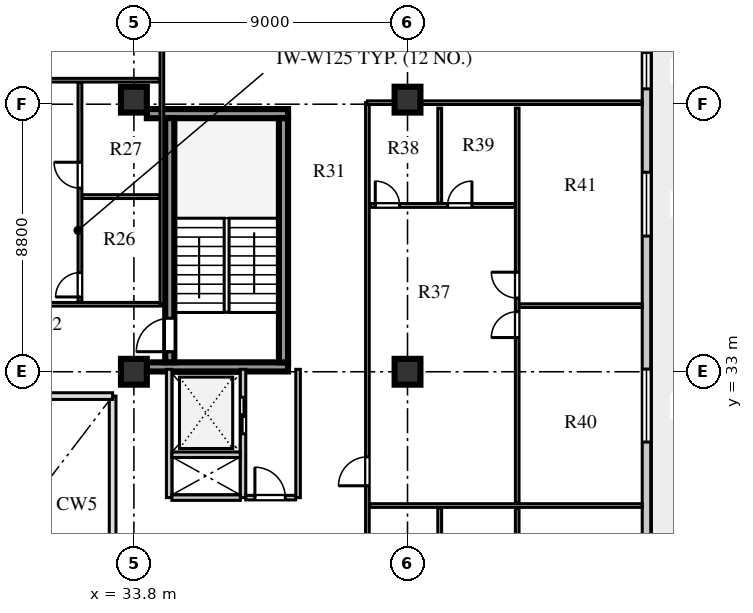
"""IFC4 building model, lengths in metres.
Left out: names, types, materials, properties, quantities, classifications, styles, units other than length and angle.
Written with IfcOpenShell. Run it as: python <this file> out.ifc"""

import sys

from ifc_helpers import new_model, si_unit, direction, frame, frame_2d, origin, origin_2d, place, context, subcontext, project, spatial, rectangle, extrude, element, fill, save


model = new_model("IFC4")
c1 = context("Model", 3, precision=1e-05, world=origin(), true_north=direction((0.0, 1.0)))
c2 = subcontext(c1, "Body", "Model", "MODEL_VIEW")
j1 = project(units=[si_unit("LENGTHUNIT", "METRE"), si_unit("PLANEANGLEUNIT", "RADIAN")], contexts=[c1])
p1 = place(None, origin())
s1 = spatial("IfcSite", under=j1, at=p1, CompositionType="ELEMENT")
p2 = place(p1, origin())
s2 = spatial("IfcBuilding", under=s1, at=p2, CompositionType="ELEMENT")
p3 = place(p2, frame((0.0, 0.0, 214.1)))
s3 = spatial("IfcBuildingStorey", under=s2, at=p3, CompositionType="ELEMENT", Elevation=214.1)
for number, where, z_axis, x_axis in (
    (1, (34.225, 33.16, 0.0), (0.0, 0.0, 1.0), (1.0, 0.0, 0.0)),
    (2, (34.225, 41.49, 0.0), (0.0, 0.0, 1.0), (1.0, 0.0, 0.0)),
):
    element("IfcWall", number, at=place(p3, frame(where, z_axis=z_axis, x_axis=x_axis)), inside=s3, PredefinedType="SHEAR", context=c2, shape_type="SweptSolid", body=[
        extrude(rectangle(XDim=4.645, YDim=0.3, at=frame_2d((2.323, 0.0))), origin(), (0.0, 0.0, 1.0), 3.66),
    ])
p4 = place(p3, frame((34.98, 33.31, 0.0), z_axis=(0.0, 0.0, 1.0), x_axis=(0.0, 1.0, 0.0)))
e3 = element("IfcWall", 3, at=p4, inside=s3, PredefinedType="SHEAR", context=c2, shape_type="SweptSolid", body=[
    extrude(rectangle(XDim=8.03, YDim=0.3, at=frame_2d((4.015, 0.0))), origin(), (0.0, 0.0, 1.0), 3.66),
])
p5 = place(p4, frame((0.35, 0.0, 0.0)))
e4 = element("IfcOpeningElement", 4, at=p5, cuts=e3, PredefinedType="OPENING", context=c2, shape_type="SweptSolid", body=[
    extrude(rectangle(XDim=1.1, YDim=2.1, at=frame_2d((0.55, 1.05))), frame((0.0, 0.16, 0.0), z_axis=(0.0, -1.0, 0.0), x_axis=(1.0, 0.0, 0.0)), (0.0, 0.0, 1.0), 0.32),
])
p6 = place(p3, frame((38.72, 33.31, 0.0), z_axis=(0.0, 0.0, 1.0), x_axis=(0.0, 1.0, 0.0)))
e5 = element("IfcWall", 5, at=p6, inside=s3, PredefinedType="SHEAR", context=c2, shape_type="SweptSolid", body=[
    extrude(rectangle(XDim=8.03, YDim=0.3, at=frame_2d((4.015, 0.0))), origin(), (0.0, 0.0, 1.0), 3.66),
])
for number, where, z_axis, x_axis in (
    (6, (33.8, 33.0, 0.0), (0.0, 0.0, 1.0), (1.0, 0.0, 0.0)),
    (7, (33.8, 41.95, 0.0), (0.0, 0.0, 1.0), (1.0, 0.0, 0.0)),
    (8, (42.8, 33.0, 0.0), (0.0, 0.0, 1.0), (1.0, 0.0, 0.0)),
    (9, (42.8, 41.95, 0.0), (0.0, 0.0, 1.0), (1.0, 0.0, 0.0)),
):
    element("IfcColumn", number, at=place(p3, frame(where, z_axis=z_axis, x_axis=x_axis)), inside=s3, PredefinedType="COLUMN", context=c2, shape_type="SweptSolid", body=[
        extrude(rectangle(XDim=0.85, YDim=0.85, at=origin_2d()), origin(), (0.0, 0.0, 1.0), 3.66),
    ])
p7 = place(p3, frame((50.66, 13.13, 0.0), z_axis=(0.0, 0.0, 1.0), x_axis=(0.0, 1.0, 0.0)))
e10 = element("IfcWall", 10, at=p7, inside=s3, PredefinedType="STANDARD", context=c2, shape_type="SweptSolid", body=[
    extrude(rectangle(XDim=30.94, YDim=0.28, at=frame_2d((15.47, 0.0))), origin(), (0.0, 0.0, 1.0), 3.66),
])
p8 = place(p7, frame((0.67, 0.0, 0.0)))
e11 = element("IfcOpeningElement", 11, at=p8, cuts=e10, PredefinedType="OPENING", context=c2, shape_type="SweptSolid", body=[
    extrude(rectangle(XDim=1.0, YDim=2.05, at=frame_2d((0.5, 1.025))), frame((0.0, 0.15, 0.0), z_axis=(0.0, -1.0, 0.0), x_axis=(1.0, 0.0, 0.0)), (0.0, 0.0, 1.0), 0.3),
])
p9 = place(p7, frame((4.33, 0.0, 0.8)))
e12 = element("IfcOpeningElement", 12, at=p9, cuts=e10, PredefinedType="OPENING", context=c2, shape_type="SweptSolid", body=[
    extrude(rectangle(XDim=1.5, YDim=2.0, at=frame_2d((0.75, 1.0))), frame((0.0, 0.15, 0.0), z_axis=(0.0, -1.0, 0.0), x_axis=(1.0, 0.0, 0.0)), (0.0, 0.0, 1.0), 0.3),
])
p10 = place(p7, frame((11.105, 0.0, 0.8)))
e13 = element("IfcOpeningElement", 13, at=p10, cuts=e10, PredefinedType="OPENING", context=c2, shape_type="SweptSolid", body=[
    extrude(rectangle(XDim=1.2, YDim=1.75, at=frame_2d((0.6, 0.875))), frame((0.0, 0.15, 0.0), z_axis=(0.0, -1.0, 0.0), x_axis=(1.0, 0.0, 0.0)), (0.0, 0.0, 1.0), 0.3),
])
p11 = place(p7, frame((17.558, 0.0, 0.8)))
e14 = element("IfcOpeningElement", 14, at=p11, cuts=e10, PredefinedType="OPENING", context=c2, shape_type="SweptSolid", body=[
    extrude(rectangle(XDim=2.4, YDim=2.05, at=frame_2d((1.2, 1.025))), frame((0.0, 0.15, 0.0), z_axis=(0.0, -1.0, 0.0), x_axis=(1.0, 0.0, 0.0)), (0.0, 0.0, 1.0), 0.3),
])
p12 = place(p7, frame((24.332, 0.0, 0.8)))
e15 = element("IfcOpeningElement", 15, at=p12, cuts=e10, PredefinedType="OPENING", context=c2, shape_type="SweptSolid", body=[
    extrude(rectangle(XDim=2.1, YDim=1.95, at=frame_2d((1.05, 0.975))), frame((0.0, 0.15, 0.0), z_axis=(0.0, -1.0, 0.0), x_axis=(1.0, 0.0, 0.0)), (0.0, 0.0, 1.0), 0.3),
])
p13 = place(p7, frame((29.175, 0.0, 0.8)))
e16 = element("IfcOpeningElement", 16, at=p13, cuts=e10, PredefinedType="OPENING", context=c2, shape_type="SweptSolid", body=[
    extrude(rectangle(XDim=1.2, YDim=1.75, at=frame_2d((0.6, 0.875))), frame((0.0, 0.15, 0.0), z_axis=(0.0, -1.0, 0.0), x_axis=(1.0, 0.0, 0.0)), (0.0, 0.0, 1.0), 0.3),
])
p14 = place(p3, frame((34.96, 28.86, 0.0), z_axis=(0.0, 0.0, 1.0), x_axis=(0.0, 1.0, 0.0)))
e17 = element("IfcWall", 17, at=p14, inside=s3, PredefinedType="SOLIDWALL", context=c2, shape_type="SweptSolid", body=[
    extrude(rectangle(XDim=4.22, YDim=0.18, at=frame_2d((2.11, 0.0))), origin(), (0.0, 0.0, 1.0), 3.66),
])
p15 = place(p3, frame((37.39, 28.86, 0.0), z_axis=(0.0, 0.0, 1.0), x_axis=(0.0, 1.0, 0.0)))
e18 = element("IfcWall", 18, at=p15, inside=s3, PredefinedType="SOLIDWALL", context=c2, shape_type="SweptSolid", body=[
    extrude(rectangle(XDim=4.22, YDim=0.18, at=frame_2d((2.11, 0.0))), origin(), (0.0, 0.0, 1.0), 3.66),
])
p16 = place(p15, frame((2.1, 0.0, 0.0)))
e19 = element("IfcOpeningElement", 19, at=p16, cuts=e18, PredefinedType="OPENING", context=c2, shape_type="SweptSolid", body=[
    extrude(rectangle(XDim=1.2, YDim=2.12, at=frame_2d((0.6, 1.06))), frame((0.0, 0.1, 0.0), z_axis=(0.0, -1.0, 0.0), x_axis=(1.0, 0.0, 0.0)), (0.0, 0.0, 1.0), 0.2),
])
for number, where, z_axis, x_axis in (
    (20, (35.05, 28.86, 0.0), (0.0, 0.0, 1.0), (1.0, 0.0, 0.0)),
    (21, (35.05, 30.27, 0.0), (0.0, 0.0, 1.0), (1.0, 0.0, 0.0)),
):
    element("IfcWall", number, at=place(p3, frame(where, z_axis=z_axis, x_axis=x_axis)), inside=s3, PredefinedType="SOLIDWALL", context=c2, shape_type="SweptSolid", body=[
        extrude(rectangle(XDim=2.25, YDim=0.18, at=frame_2d((1.125, 0.0))), origin(), (0.0, 0.0, 1.0), 3.66),
    ])
p17 = place(p3, frame((39.2, 28.86, 0.0), z_axis=(0.0, 0.0, 1.0), x_axis=(0.0, 1.0, 0.0)))
e22 = element("IfcWall", 22, at=p17, inside=s3, PredefinedType="PARTITIONING", context=c2, shape_type="SweptSolid", body=[
    extrude(rectangle(XDim=4.22, YDim=0.15, at=frame_2d((2.11, 0.0))), origin(), (0.0, 0.0, 1.0), 3.66),
])
p18 = place(p3, frame((37.48, 28.86, 0.0), z_axis=(0.0, 0.0, 1.0), x_axis=(1.0, 0.0, 0.0)))
e23 = element("IfcWall", 23, at=p18, inside=s3, PredefinedType="PARTITIONING", context=c2, shape_type="SweptSolid", body=[
    extrude(rectangle(XDim=1.64, YDim=0.15, at=frame_2d((0.82, 0.0))), origin(), (0.0, 0.0, 1.0), 3.66),
])
p19 = place(p18, frame((0.3, 0.0, 0.0)))
e24 = element("IfcOpeningElement", 24, at=p19, cuts=e23, PredefinedType="OPENING", context=c2, shape_type="SweptSolid", body=[
    extrude(rectangle(XDim=1.0, YDim=2.1, at=frame_2d((0.5, 1.05))), frame((0.0, 0.085, 0.0), z_axis=(0.0, -1.0, 0.0), x_axis=(1.0, 0.0, 0.0)), (0.0, 0.0, 1.0), 0.17),
])
p20 = place(p3, frame((25.22, 35.22, 0.0), z_axis=(0.0, 0.0, 1.0), x_axis=(1.0, 0.0, 0.0)))
e25 = element("IfcWall", 25, at=p20, inside=s3, PredefinedType="PARTITIONING", context=c2, shape_type="SweptSolid", body=[
    extrude(rectangle(XDim=9.5, YDim=0.12, at=frame_2d((4.75, 0.0))), origin(), (0.0, 0.0, 1.0), 3.66),
])
p21 = place(p20, frame((1.1, 0.0, 0.0)))
e26 = element("IfcOpeningElement", 26, at=p21, cuts=e25, PredefinedType="OPENING", context=c2, shape_type="SweptSolid", body=[
    extrude(rectangle(XDim=0.95, YDim=2.1, at=frame_2d((0.475, 1.05))), frame((0.0, 0.07, 0.0), z_axis=(0.0, -1.0, 0.0), x_axis=(1.0, 0.0, 0.0)), (0.0, 0.0, 1.0), 0.14),
])
p22 = place(p3, frame((34.72, 35.22, 0.0), z_axis=(0.0, 0.0, 1.0), x_axis=(0.0, 1.0, 0.0)))
e27 = element("IfcWall", 27, at=p22, inside=s3, PredefinedType="PARTITIONING", context=c2, shape_type="SweptSolid", body=[
    extrude(rectangle(XDim=14.1, YDim=0.12, at=frame_2d((7.05, 0.0))), origin(), (0.0, 0.0, 1.0), 3.66),
])
p23 = place(p3, frame((25.3, 42.59, 0.0), z_axis=(0.0, 0.0, 1.0), x_axis=(1.0, 0.0, 0.0)))
e28 = element("IfcWall", 28, at=p23, inside=s3, PredefinedType="PARTITIONING", context=c2, shape_type="SweptSolid", body=[
    extrude(rectangle(XDim=9.34, YDim=0.12, at=frame_2d((4.67, 0.0))), origin(), (0.0, 0.0, 1.0), 3.66),
])
p24 = place(p23, frame((0.6, 0.0, 0.0)))
e29 = element("IfcOpeningElement", 29, at=p24, cuts=e28, PredefinedType="OPENING", context=c2, shape_type="SweptSolid", body=[
    extrude(rectangle(XDim=0.85, YDim=2.08, at=frame_2d((0.425, 1.04))), frame((0.0, 0.07, 0.0), z_axis=(0.0, -1.0, 0.0), x_axis=(1.0, 0.0, 0.0)), (0.0, 0.0, 1.0), 0.14),
])
p25 = place(p23, frame((3.573, 0.0, 0.0)))
e30 = element("IfcOpeningElement", 30, at=p25, cuts=e28, PredefinedType="OPENING", context=c2, shape_type="SweptSolid", body=[
    extrude(rectangle(XDim=0.85, YDim=2.08, at=frame_2d((0.425, 1.04))), frame((0.0, 0.07, 0.0), z_axis=(0.0, -1.0, 0.0), x_axis=(1.0, 0.0, 0.0)), (0.0, 0.0, 1.0), 0.14),
])
p26 = place(p3, frame((32.025, 35.3, 0.0), z_axis=(0.0, 0.0, 1.0), x_axis=(0.0, 1.0, 0.0)))
e31 = element("IfcWall", 31, at=p26, inside=s3, PredefinedType="PLUMBINGWALL", context=c2, shape_type="SweptSolid", body=[
    extrude(rectangle(XDim=7.21, YDim=0.125, at=frame_2d((3.605, 0.0))), origin(), (0.0, 0.0, 1.0), 3.66),
])
p27 = place(p26, frame((0.16, 0.0, 0.0)))
e32 = element("IfcOpeningElement", 32, at=p27, cuts=e31, PredefinedType="OPENING", context=c2, shape_type="SweptSolid", body=[
    extrude(rectangle(XDim=0.8, YDim=2.05, at=frame_2d((0.4, 1.025))), frame((0.0, 0.073, 0.0), z_axis=(0.0, -1.0, 0.0), x_axis=(1.0, 0.0, 0.0)), (0.0, 0.0, 1.0), 0.145),
])
p28 = place(p26, frame((3.741, 0.0, 0.0)))
e33 = element("IfcOpeningElement", 33, at=p28, cuts=e31, PredefinedType="OPENING", context=c2, shape_type="SweptSolid", body=[
    extrude(rectangle(XDim=0.85, YDim=2.08, at=frame_2d((0.425, 1.04))), frame((0.0, 0.073, 0.0), z_axis=(0.0, -1.0, 0.0), x_axis=(1.0, 0.0, 0.0)), (0.0, 0.0, 1.0), 0.145),
])
p29 = place(p3, frame((32.105, 38.761, 0.0), z_axis=(0.0, 0.0, 1.0), x_axis=(1.0, 0.0, 0.0)))
e34 = element("IfcWall", 34, at=p29, inside=s3, PredefinedType="PLUMBINGWALL", context=c2, shape_type="SweptSolid", body=[
    extrude(rectangle(XDim=2.535, YDim=0.125, at=frame_2d((1.268, 0.0))), origin(), (0.0, 0.0, 1.0), 3.66),
])
p30 = place(p3, frame((41.48, 15.35, 0.0), z_axis=(0.0, 0.0, 1.0), x_axis=(0.0, 1.0, 0.0)))
e35 = element("IfcWall", 35, at=p30, inside=s3, PredefinedType="PARTITIONING", context=c2, shape_type="SweptSolid", body=[
    extrude(rectangle(XDim=26.5, YDim=0.12, at=frame_2d((13.25, 0.0))), origin(), (0.0, 0.0, 1.0), 3.66),
])
p31 = place(p30, frame((0.75, 0.0, 0.0)))
e36 = element("IfcOpeningElement", 36, at=p31, cuts=e35, PredefinedType="OPENING", context=c2, shape_type="SweptSolid", body=[
    extrude(rectangle(XDim=0.95, YDim=2.1, at=frame_2d((0.475, 1.05))), frame((0.0, 0.07, 0.0), z_axis=(0.0, -1.0, 0.0), x_axis=(1.0, 0.0, 0.0)), (0.0, 0.0, 1.0), 0.14),
])
p32 = place(p30, frame((13.9, 0.0, 0.0)))
e37 = element("IfcOpeningElement", 37, at=p32, cuts=e35, PredefinedType="OPENING", context=c2, shape_type="SweptSolid", body=[
    extrude(rectangle(XDim=0.95, YDim=2.1, at=frame_2d((0.475, 1.05))), frame((0.0, 0.07, 0.0), z_axis=(0.0, -1.0, 0.0), x_axis=(1.0, 0.0, 0.0)), (0.0, 0.0, 1.0), 0.14),
])
p33 = place(p3, frame((41.48, 41.85, 0.0), z_axis=(0.0, 0.0, 1.0), x_axis=(1.0, 0.0, 0.0)))
e38 = element("IfcWall", 38, at=p33, inside=s3, PredefinedType="PARTITIONING", context=c2, shape_type="SweptSolid", body=[
    extrude(rectangle(XDim=9.04, YDim=0.12, at=frame_2d((4.52, 0.0))), origin(), (0.0, 0.0, 1.0), 3.06),
])
p34 = place(p3, frame((46.408, 15.53, 0.0), z_axis=(0.0, 0.0, 1.0), x_axis=(0.0, 1.0, 0.0)))
e39 = element("IfcWall", 39, at=p34, inside=s3, PredefinedType="PARTITIONING", context=c2, shape_type="SweptSolid", body=[
    extrude(rectangle(XDim=12.99, YDim=0.12, at=frame_2d((6.495, 0.0))), origin(), (0.0, 0.0, 1.0), 3.66),
])
p35 = place(p34, frame((4.49, 0.0, 0.0)))
e40 = element("IfcOpeningElement", 40, at=p35, cuts=e39, PredefinedType="OPENING", context=c2, shape_type="SweptSolid", body=[
    extrude(rectangle(XDim=0.85, YDim=2.08, at=frame_2d((0.425, 1.04))), frame((0.0, 0.07, 0.0), z_axis=(0.0, -1.0, 0.0), x_axis=(1.0, 0.0, 0.0)), (0.0, 0.0, 1.0), 0.14),
])
p36 = place(p34, frame((5.79, 0.0, 0.0)))
e41 = element("IfcOpeningElement", 41, at=p36, cuts=e39, PredefinedType="OPENING", context=c2, shape_type="SweptSolid", body=[
    extrude(rectangle(XDim=0.85, YDim=2.08, at=frame_2d((0.425, 1.04))), frame((0.0, 0.07, 0.0), z_axis=(0.0, -1.0, 0.0), x_axis=(1.0, 0.0, 0.0)), (0.0, 0.0, 1.0), 0.14),
])
p37 = place(p3, frame((43.859, 22.48, 0.0), z_axis=(0.0, 0.0, 1.0), x_axis=(0.0, 1.0, 0.0)))
e42 = element("IfcWall", 42, at=p37, inside=s3, PredefinedType="PLUMBINGWALL", context=c2, shape_type="SweptSolid", body=[
    extrude(rectangle(XDim=6.04, YDim=0.125, at=frame_2d((3.02, 0.0))), origin(), (0.0, 0.0, 1.0), 3.66),
])
p38 = place(p3, frame((41.56, 28.6, 0.0), z_axis=(0.0, 0.0, 1.0), x_axis=(1.0, 0.0, 0.0)))
e43 = element("IfcWall", 43, at=p38, inside=s3, PredefinedType="PARTITIONING", context=c2, shape_type="SweptSolid", body=[
    extrude(rectangle(XDim=8.96, YDim=0.12, at=frame_2d((4.48, 0.0))), origin(), (0.0, 0.0, 1.0), 3.66),
])
p39 = place(p3, frame((46.408, 28.68, 0.0), z_axis=(0.0, 0.0, 1.0), x_axis=(0.0, 1.0, 0.0)))
e44 = element("IfcWall", 44, at=p39, inside=s3, PredefinedType="PARTITIONING", context=c2, shape_type="SweptSolid", body=[
    extrude(rectangle(XDim=12.99, YDim=0.12, at=frame_2d((6.495, 0.0))), origin(), (0.0, 0.0, 1.0), 3.66),
])
p40 = place(p39, frame((5.445, 0.0, 0.0)))
e45 = element("IfcOpeningElement", 45, at=p40, cuts=e44, PredefinedType="OPENING", context=c2, shape_type="SweptSolid", body=[
    extrude(rectangle(XDim=0.85, YDim=2.08, at=frame_2d((0.425, 1.04))), frame((0.0, 0.07, 0.0), z_axis=(0.0, -1.0, 0.0), x_axis=(1.0, 0.0, 0.0)), (0.0, 0.0, 1.0), 0.14),
])
p41 = place(p39, frame((6.745, 0.0, 0.0)))
e46 = element("IfcOpeningElement", 46, at=p41, cuts=e44, PredefinedType="OPENING", context=c2, shape_type="SweptSolid", body=[
    extrude(rectangle(XDim=0.85, YDim=2.08, at=frame_2d((0.425, 1.04))), frame((0.0, 0.07, 0.0), z_axis=(0.0, -1.0, 0.0), x_axis=(1.0, 0.0, 0.0)), (0.0, 0.0, 1.0), 0.14),
])
p42 = place(p3, frame((41.58, 38.47, 0.0), z_axis=(0.0, 0.0, 1.0), x_axis=(1.0, 0.0, 0.0)))
e47 = element("IfcWall", 47, at=p42, inside=s3, PredefinedType="PLUMBINGWALL", context=c2, shape_type="SweptSolid", body=[
    extrude(rectangle(XDim=4.748, YDim=0.125, at=frame_2d((2.374, 0.0))), origin(), (0.0, 0.0, 1.0), 3.66),
])
p43 = place(p42, frame((0.16, 0.0, 0.0)))
e48 = element("IfcOpeningElement", 48, at=p43, cuts=e47, PredefinedType="OPENING", context=c2, shape_type="SweptSolid", body=[
    extrude(rectangle(XDim=0.8, YDim=2.05, at=frame_2d((0.4, 1.025))), frame((0.0, 0.073, 0.0), z_axis=(0.0, -1.0, 0.0), x_axis=(1.0, 0.0, 0.0)), (0.0, 0.0, 1.0), 0.145),
])
p44 = place(p42, frame((2.539, 0.0, 0.0)))
e49 = element("IfcOpeningElement", 49, at=p44, cuts=e47, PredefinedType="OPENING", context=c2, shape_type="SweptSolid", body=[
    extrude(rectangle(XDim=0.8, YDim=2.05, at=frame_2d((0.4, 1.025))), frame((0.0, 0.073, 0.0), z_axis=(0.0, -1.0, 0.0), x_axis=(1.0, 0.0, 0.0)), (0.0, 0.0, 1.0), 0.145),
])
p45 = place(p3, frame((43.859, 38.55, 0.0), z_axis=(0.0, 0.0, 1.0), x_axis=(0.0, 1.0, 0.0)))
e50 = element("IfcWall", 50, at=p45, inside=s3, PredefinedType="PLUMBINGWALL", context=c2, shape_type="SweptSolid", body=[
    extrude(rectangle(XDim=3.12, YDim=0.125, at=frame_2d((1.56, 0.0))), origin(), (0.0, 0.0, 1.0), 3.66),
])
p46 = place(p3, frame((46.488, 35.175, 0.0), z_axis=(0.0, 0.0, 1.0), x_axis=(1.0, 0.0, 0.0)))
e51 = element("IfcWall", 51, at=p46, inside=s3, PredefinedType="PARTITIONING", context=c2, shape_type="SweptSolid", body=[
    extrude(rectangle(XDim=4.032, YDim=0.12, at=frame_2d((2.016, 0.0))), origin(), (0.0, 0.0, 1.0), 3.66),
])
p47 = place(p11, origin())
e52 = element("IfcWindow", 52, at=p47, inside=s3, PartitioningType="SINGLE_PANEL", PredefinedType="WINDOW", context=c2, shape_type="SweptSolid", body=[
    extrude(rectangle(XDim=2.4, YDim=2.05, at=frame_2d((1.2, 1.025))), frame((0.0, 0.03, 0.0), z_axis=(0.0, -1.0, 0.0), x_axis=(1.0, 0.0, 0.0)), (0.0, 0.0, 1.0), 0.06),
])
fill(e14, e52)
p48 = place(p12, origin())
e53 = element("IfcWindow", 53, at=p48, inside=s3, PartitioningType="SINGLE_PANEL", PredefinedType="WINDOW", context=c2, shape_type="SweptSolid", body=[
    extrude(rectangle(XDim=2.1, YDim=1.95, at=frame_2d((1.05, 0.975))), frame((0.0, 0.03, 0.0), z_axis=(0.0, -1.0, 0.0), x_axis=(1.0, 0.0, 0.0)), (0.0, 0.0, 1.0), 0.06),
])
fill(e15, e53)
p49 = place(p13, origin())
e54 = element("IfcWindow", 54, at=p49, inside=s3, PartitioningType="SINGLE_PANEL", PredefinedType="WINDOW", context=c2, shape_type="SweptSolid", body=[
    extrude(rectangle(XDim=1.2, YDim=1.75, at=frame_2d((0.6, 0.875))), frame((0.0, 0.03, 0.0), z_axis=(0.0, -1.0, 0.0), x_axis=(1.0, 0.0, 0.0)), (0.0, 0.0, 1.0), 0.06),
])
fill(e16, e54)
p50 = place(p5, origin())
e55 = element("IfcDoor", 55, at=p50, inside=s3, OperationType="SINGLE_SWING_LEFT", PredefinedType="DOOR", context=c2, shape_type="SweptSolid", body=[
    extrude(rectangle(XDim=1.1, YDim=2.1, at=frame_2d((0.55, 1.05))), frame((0.0, 0.025, 0.0), z_axis=(0.0, -1.0, 0.0), x_axis=(1.0, 0.0, 0.0)), (0.0, 0.0, 1.0), 0.05),
])
fill(e4, e55)
p51 = place(p16, frame((1.2, 0.0, 0.0), z_axis=(0.0, 0.0, 1.0), x_axis=(-1.0, 0.0, 0.0)))
e56 = element("IfcDoor", 56, at=p51, inside=s3, OperationType="DOUBLE_DOOR_SLIDING", PredefinedType="DOOR", context=c2, shape_type="SweptSolid", body=[
    extrude(rectangle(XDim=1.2, YDim=2.12, at=frame_2d((0.6, 1.06))), frame((0.0, 0.025, 0.0), z_axis=(0.0, -1.0, 0.0), x_axis=(1.0, 0.0, 0.0)), (0.0, 0.0, 1.0), 0.05),
])
fill(e19, e56)
p52 = place(p19, origin())
e57 = element("IfcDoor", 57, at=p52, inside=s3, OperationType="SINGLE_SWING_LEFT", PredefinedType="DOOR", context=c2, shape_type="SweptSolid", body=[
    extrude(rectangle(XDim=1.0, YDim=2.1, at=frame_2d((0.5, 1.05))), frame((0.0, 0.025, 0.0), z_axis=(0.0, -1.0, 0.0), x_axis=(1.0, 0.0, 0.0)), (0.0, 0.0, 1.0), 0.05),
])
fill(e24, e57)
p53 = place(p27, origin())
e58 = element("IfcDoor", 58, at=p53, inside=s3, OperationType="SINGLE_SWING_LEFT", PredefinedType="DOOR", context=c2, shape_type="SweptSolid", body=[
    extrude(rectangle(XDim=0.8, YDim=2.05, at=frame_2d((0.4, 1.025))), frame((0.0, 0.025, 0.0), z_axis=(0.0, -1.0, 0.0), x_axis=(1.0, 0.0, 0.0)), (0.0, 0.0, 1.0), 0.05),
])
fill(e32, e58)
p54 = place(p28, origin())
e59 = element("IfcDoor", 59, at=p54, inside=s3, OperationType="SINGLE_SWING_RIGHT", PredefinedType="DOOR", context=c2, shape_type="SweptSolid", body=[
    extrude(rectangle(XDim=0.85, YDim=2.08, at=frame_2d((0.425, 1.04))), frame((0.0, 0.025, 0.0), z_axis=(0.0, -1.0, 0.0), x_axis=(1.0, 0.0, 0.0)), (0.0, 0.0, 1.0), 0.05),
])
fill(e33, e59)
p55 = place(p43, origin())
e60 = element("IfcDoor", 60, at=p55, inside=s3, OperationType="SINGLE_SWING_LEFT", PredefinedType="DOOR", context=c2, shape_type="SweptSolid", body=[
    extrude(rectangle(XDim=0.8, YDim=2.05, at=frame_2d((0.4, 1.025))), frame((0.0, 0.025, 0.0), z_axis=(0.0, -1.0, 0.0), x_axis=(1.0, 0.0, 0.0)), (0.0, 0.0, 1.0), 0.05),
])
fill(e48, e60)
p56 = place(p44, origin())
e61 = element("IfcDoor", 61, at=p56, inside=s3, OperationType="SINGLE_SWING_RIGHT", PredefinedType="DOOR", context=c2, shape_type="SweptSolid", body=[
    extrude(rectangle(XDim=0.8, YDim=2.05, at=frame_2d((0.4, 1.025))), frame((0.0, 0.025, 0.0), z_axis=(0.0, -1.0, 0.0), x_axis=(1.0, 0.0, 0.0)), (0.0, 0.0, 1.0), 0.05),
])
fill(e49, e61)
p57 = place(p40, origin())
e62 = element("IfcDoor", 62, at=p57, inside=s3, OperationType="SINGLE_SWING_LEFT", PredefinedType="DOOR", context=c2, shape_type="SweptSolid", body=[
    extrude(rectangle(XDim=0.85, YDim=2.08, at=frame_2d((0.425, 1.04))), frame((0.0, 0.025, 0.0), z_axis=(0.0, -1.0, 0.0), x_axis=(1.0, 0.0, 0.0)), (0.0, 0.0, 1.0), 0.05),
])
fill(e45, e62)
p58 = place(p41, origin())
e63 = element("IfcDoor", 63, at=p58, inside=s3, OperationType="SINGLE_SWING_RIGHT", PredefinedType="DOOR", context=c2, shape_type="SweptSolid", body=[
    extrude(rectangle(XDim=0.85, YDim=2.08, at=frame_2d((0.425, 1.04))), frame((0.0, 0.025, 0.0), z_axis=(0.0, -1.0, 0.0), x_axis=(1.0, 0.0, 0.0)), (0.0, 0.0, 1.0), 0.05),
])
fill(e46, e63)
p59 = place(p32, origin())
e64 = element("IfcDoor", 64, at=p59, inside=s3, OperationType="SINGLE_SWING_LEFT", PredefinedType="DOOR", context=c2, shape_type="SweptSolid", body=[
    extrude(rectangle(XDim=0.95, YDim=2.1, at=frame_2d((0.475, 1.05))), frame((0.0, 0.025, 0.0), z_axis=(0.0, -1.0, 0.0), x_axis=(1.0, 0.0, 0.0)), (0.0, 0.0, 1.0), 0.05),
])
fill(e37, e64)
save(model, sys.argv[1])
